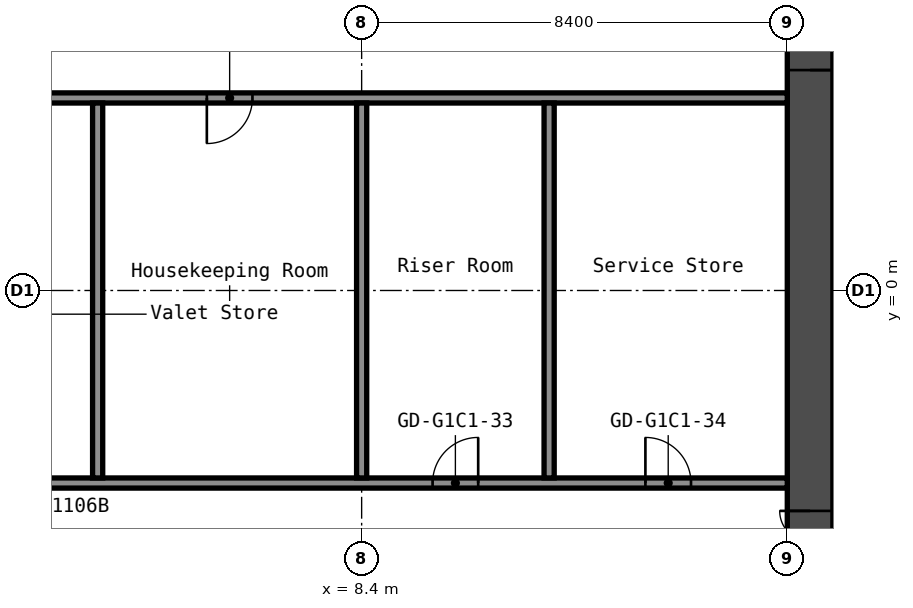
"""IFC4 building model, lengths in metres.
Left out: names, types, materials, properties, quantities, classifications, styles, units other than length and angle.
Written with IfcOpenShell. Run it as: python <this file> out.ifc"""

import sys

from ifc_helpers import new_model, si_unit, direction, frame, frame_2d, origin, place, context, subcontext, project, spatial, rectangle, extrude, element, fill, save


model = new_model("IFC4")
c1 = context("Model", 3, precision=1e-05, world=origin(), true_north=direction((0.0, 1.0)))
c2 = subcontext(c1, "Body", "Model", "MODEL_VIEW")
j1 = project(units=[si_unit("LENGTHUNIT", "METRE"), si_unit("PLANEANGLEUNIT", "RADIAN")], contexts=[c1])
p1 = place(None, origin())
s1 = spatial("IfcSite", under=j1, at=p1, CompositionType="ELEMENT")
p2 = place(p1, origin())
s2 = spatial("IfcBuilding", under=s1, at=p2, CompositionType="ELEMENT")
p3 = place(p2, frame((0.0, 0.0, 42.2)))
s3 = spatial("IfcBuildingStorey", under=s2, at=p3, CompositionType="ELEMENT", Elevation=42.2)
p4 = place(p3, frame((17.25, -8.4, 0.0), z_axis=(0.0, 0.0, 1.0), x_axis=(0.0, 1.0, 0.0)))
e1 = element("IfcWall", 1, at=p4, inside=s3, PredefinedType="SHEAR", context=c2, shape_type="SweptSolid", body=[
    extrude(rectangle(XDim=16.8, YDim=0.9, at=frame_2d((8.4, 0.0))), origin(), (0.0, 0.0, 1.0), 2.8),
])
p5 = place(p4, frame((12.75, 0.0, 0.0)))
e2 = element("IfcOpeningElement", 2, at=p5, cuts=e1, PredefinedType="OPENING", context=c2, shape_type="SweptSolid", body=[
    extrude(rectangle(XDim=1.2, YDim=2.1, at=frame_2d((0.6, 1.05))), frame((0.0, 0.46, 0.0), z_axis=(0.0, -1.0, 0.0), x_axis=(1.0, 0.0, 0.0)), (0.0, 0.0, 1.0), 0.92),
])
p6 = place(p4, frame((2.85, 0.0, 0.0)))
e3 = element("IfcOpeningElement", 3, at=p6, cuts=e1, PredefinedType="OPENING", context=c2, shape_type="SweptSolid", body=[
    extrude(rectangle(XDim=1.2, YDim=2.1, at=frame_2d((0.6, 1.05))), frame((0.0, 0.46, 0.0), z_axis=(0.0, -1.0, 0.0), x_axis=(1.0, 0.0, 0.0)), (0.0, 0.0, 1.0), 0.92),
])
p7 = place(p3, frame((-16.8, -3.8, 0.0), z_axis=(0.0, 0.0, 1.0), x_axis=(1.0, 0.0, 0.0)))
e4 = element("IfcWall", 4, at=p7, inside=s3, PredefinedType="PARTITIONING", context=c2, shape_type="SweptSolid", body=[
    extrude(rectangle(XDim=33.6, YDim=0.2, at=frame_2d((16.8, 0.0))), origin(), (0.0, 0.0, 1.0), 2.8),
])
p8 = place(p7, frame((9.46, 0.0, 0.0)))
e5 = element("IfcOpeningElement", 5, at=p8, cuts=e4, PredefinedType="OPENING", context=c2, shape_type="SweptSolid", body=[
    extrude(rectangle(XDim=0.9, YDim=2.1, at=frame_2d((0.45, 1.05))), frame((0.0, 0.11, 0.0), z_axis=(0.0, -1.0, 0.0), x_axis=(1.0, 0.0, 0.0)), (0.0, 0.0, 1.0), 0.22),
])
p9 = place(p7, frame((13.66, 0.0, 0.0)))
e6 = element("IfcOpeningElement", 6, at=p9, cuts=e4, PredefinedType="OPENING", context=c2, shape_type="SweptSolid", body=[
    extrude(rectangle(XDim=0.9, YDim=2.1, at=frame_2d((0.45, 1.05))), frame((0.0, 0.11, 0.0), z_axis=(0.0, -1.0, 0.0), x_axis=(1.0, 0.0, 0.0)), (0.0, 0.0, 1.0), 0.22),
])
p10 = place(p7, frame((26.6, 0.0, 0.0)))
e7 = element("IfcOpeningElement", 7, at=p10, cuts=e4, PredefinedType="OPENING", context=c2, shape_type="SweptSolid", body=[
    extrude(rectangle(XDim=0.9, YDim=2.1, at=frame_2d((0.45, 1.05))), frame((0.0, 0.11, 0.0), z_axis=(0.0, -1.0, 0.0), x_axis=(1.0, 0.0, 0.0)), (0.0, 0.0, 1.0), 0.22),
])
p11 = place(p7, frame((30.8, 0.0, 0.0)))
e8 = element("IfcOpeningElement", 8, at=p11, cuts=e4, PredefinedType="OPENING", context=c2, shape_type="SweptSolid", body=[
    extrude(rectangle(XDim=0.9, YDim=2.1, at=frame_2d((0.45, 1.05))), frame((0.0, 0.11, 0.0), z_axis=(0.0, -1.0, 0.0), x_axis=(1.0, 0.0, 0.0)), (0.0, 0.0, 1.0), 0.22),
])
p12 = place(p3, frame((-16.8, 3.8, 0.0), z_axis=(0.0, 0.0, 1.0), x_axis=(1.0, 0.0, 0.0)))
e9 = element("IfcWall", 9, at=p12, inside=s3, PredefinedType="PARTITIONING", context=c2, shape_type="SweptSolid", body=[
    extrude(rectangle(XDim=33.6, YDim=0.2, at=frame_2d((16.8, 0.0))), origin(), (0.0, 0.0, 1.0), 2.8),
])
p13 = place(p12, frame((2.24, 0.0, 0.0)))
e10 = element("IfcOpeningElement", 10, at=p13, cuts=e9, PredefinedType="OPENING", context=c2, shape_type="SweptSolid", body=[
    extrude(rectangle(XDim=0.9, YDim=2.1, at=frame_2d((0.45, 1.05))), frame((0.0, 0.11, 0.0), z_axis=(0.0, -1.0, 0.0), x_axis=(1.0, 0.0, 0.0)), (0.0, 0.0, 1.0), 0.22),
])
p14 = place(p12, frame((6.44, 0.0, 0.0)))
e11 = element("IfcOpeningElement", 11, at=p14, cuts=e9, PredefinedType="OPENING", context=c2, shape_type="SweptSolid", body=[
    extrude(rectangle(XDim=0.9, YDim=2.1, at=frame_2d((0.45, 1.05))), frame((0.0, 0.11, 0.0), z_axis=(0.0, -1.0, 0.0), x_axis=(1.0, 0.0, 0.0)), (0.0, 0.0, 1.0), 0.22),
])
p15 = place(p12, frame((17.945, 0.0, 0.0)))
e12 = element("IfcOpeningElement", 12, at=p15, cuts=e9, PredefinedType="OPENING", context=c2, shape_type="SweptSolid", body=[
    extrude(rectangle(XDim=0.9, YDim=2.1, at=frame_2d((0.45, 1.05))), frame((0.0, 0.11, 0.0), z_axis=(0.0, -1.0, 0.0), x_axis=(1.0, 0.0, 0.0)), (0.0, 0.0, 1.0), 0.22),
])
p16 = place(p12, frame((22.145, 0.0, 0.0)))
e13 = element("IfcOpeningElement", 13, at=p16, cuts=e9, PredefinedType="OPENING", context=c2, shape_type="SweptSolid", body=[
    extrude(rectangle(XDim=0.9, YDim=2.1, at=frame_2d((0.45, 1.05))), frame((0.0, 0.11, 0.0), z_axis=(0.0, -1.0, 0.0), x_axis=(1.0, 0.0, 0.0)), (0.0, 0.0, 1.0), 0.22),
])
for number, where, z_axis, x_axis in (
    (14, (3.19, -3.7, 0.0), (0.0, 0.0, 1.0), (0.0, 1.0, 0.0)),
    (15, (8.4, -3.7, 0.0), (0.0, 0.0, 1.0), (0.0, 1.0, 0.0)),
    (16, (12.1, -3.7, 0.0), (0.0, 0.0, 1.0), (0.0, 1.0, 0.0)),
):
    element("IfcWall", number, at=place(p3, frame(where, z_axis=z_axis, x_axis=x_axis)), inside=s3, PredefinedType="PARTITIONING", context=c2, shape_type="SweptSolid", body=[
        extrude(rectangle(XDim=7.4, YDim=0.2, at=frame_2d((3.7, 0.0))), origin(), (0.0, 0.0, 1.0), 2.8),
    ])
p17 = place(p5, origin())
e17 = element("IfcDoor", 17, at=p17, inside=s3, OperationType="DOUBLE_DOOR_SINGLE_SWING", PredefinedType="DOOR", context=c2, shape_type="SweptSolid", body=[
    extrude(rectangle(XDim=1.2, YDim=2.1, at=frame_2d((0.6, 1.05))), frame((0.0, 0.025, 0.0), z_axis=(0.0, -1.0, 0.0), x_axis=(1.0, 0.0, 0.0)), (0.0, 0.0, 1.0), 0.05),
])
fill(e2, e17)
p18 = place(p6, origin())
e18 = element("IfcDoor", 18, at=p18, inside=s3, OperationType="DOUBLE_DOOR_SINGLE_SWING", PredefinedType="DOOR", context=c2, shape_type="SweptSolid", body=[
    extrude(rectangle(XDim=1.2, YDim=2.1, at=frame_2d((0.6, 1.05))), frame((0.0, 0.025, 0.0), z_axis=(0.0, -1.0, 0.0), x_axis=(1.0, 0.0, 0.0)), (0.0, 0.0, 1.0), 0.05),
])
fill(e3, e18)
p19 = place(p10, origin())
e19 = element("IfcDoor", 19, at=p19, inside=s3, OperationType="SINGLE_SWING_LEFT", PredefinedType="DOOR", context=c2, shape_type="SweptSolid", body=[
    extrude(rectangle(XDim=0.9, YDim=2.1, at=frame_2d((0.45, 1.05))), frame((0.0, 0.025, 0.0), z_axis=(0.0, -1.0, 0.0), x_axis=(1.0, 0.0, 0.0)), (0.0, 0.0, 1.0), 0.05),
])
fill(e7, e19)
p20 = place(p11, origin())
e20 = element("IfcDoor", 20, at=p20, inside=s3, OperationType="SINGLE_SWING_RIGHT", PredefinedType="DOOR", context=c2, shape_type="SweptSolid", body=[
    extrude(rectangle(XDim=0.9, YDim=2.1, at=frame_2d((0.45, 1.05))), frame((0.0, 0.025, 0.0), z_axis=(0.0, -1.0, 0.0), x_axis=(1.0, 0.0, 0.0)), (0.0, 0.0, 1.0), 0.05),
])
fill(e8, e20)
p21 = place(p16, origin())
e21 = element("IfcDoor", 21, at=p21, inside=s3, OperationType="SINGLE_SWING_LEFT", PredefinedType="DOOR", context=c2, shape_type="SweptSolid", body=[
    extrude(rectangle(XDim=0.9, YDim=2.1, at=frame_2d((0.45, 1.05))), frame((0.0, 0.025, 0.0), z_axis=(0.0, -1.0, 0.0), x_axis=(1.0, 0.0, 0.0)), (0.0, 0.0, 1.0), 0.05),
])
fill(e13, e21)
save(model, sys.argv[1])
